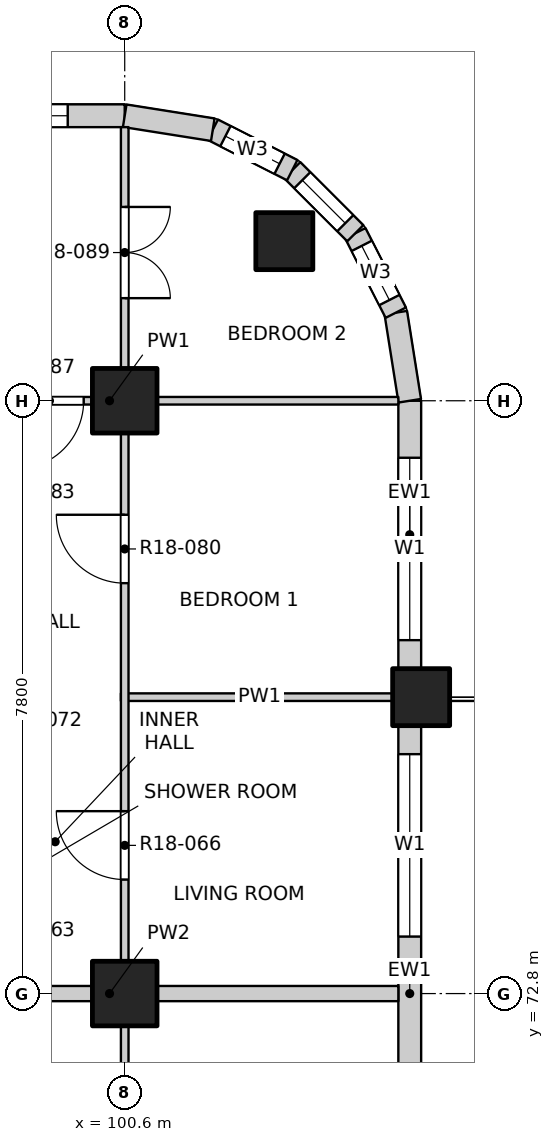
"""IFC4 building model, lengths in metres.
Left out: names, types, materials, properties, quantities, classifications, styles, units other than length and angle.
Written with IfcOpenShell. Run it as: python <this file> out.ifc"""

import sys

from ifc_helpers import new_model, si_unit, direction, frame, frame_2d, origin, origin_2d, place, context, subcontext, project, spatial, rectangle, extrude, element, fill, save


model = new_model("IFC4")
c1 = context("Model", 3, precision=1e-05, world=origin(), true_north=direction((0.0, 1.0)))
c2 = subcontext(c1, "Body", "Model", "MODEL_VIEW")
j1 = project(units=[si_unit("LENGTHUNIT", "METRE"), si_unit("PLANEANGLEUNIT", "RADIAN")], contexts=[c1])
p1 = place(None, origin())
s1 = spatial("IfcSite", under=j1, at=p1, CompositionType="ELEMENT")
p2 = place(p1, origin())
s2 = spatial("IfcBuilding", under=s1, at=p2, CompositionType="ELEMENT")
p3 = place(p2, frame((0.0, 0.0, 186.0)))
s3 = spatial("IfcBuildingStorey", under=s2, at=p3, CompositionType="ELEMENT", Elevation=186.0)
for number, where, z_axis, x_axis in (
    (1, (102.7, 82.7, -0.25), (0.0, 0.0, 1.0), (1.0, 0.0, 0.0)),
    (2, (104.5, 76.7, -0.25), (0.0, 0.0, 1.0), (1.0, 0.0, 0.0)),
):
    element("IfcColumn", number, at=place(p3, frame(where, z_axis=z_axis, x_axis=x_axis)), inside=s3, PredefinedType="COLUMN", context=c2, shape_type="SweptSolid", body=[
        extrude(rectangle(XDim=0.75, YDim=0.75, at=origin_2d()), origin(), (0.0, 0.0, 1.0), 3.4),
    ])
for number, where, z_axis, x_axis in (
    (3, (100.6, 72.8, -0.25), (0.0, 0.0, 1.0), (1.0, 0.0, 0.0)),
    (4, (100.6, 80.6, -0.25), (0.0, 0.0, 1.0), (1.0, 0.0, 0.0)),
):
    element("IfcColumn", number, at=place(p3, frame(where, z_axis=z_axis, x_axis=x_axis)), inside=s3, PredefinedType="COLUMN", context=c2, shape_type="SweptSolid", body=[
        extrude(rectangle(XDim=0.85, YDim=0.85, at=origin_2d()), origin(), (0.0, 0.0, 1.0), 3.4),
    ])
p4 = place(p3, frame((104.35, 69.275, 0.0), z_axis=(0.0, 0.0, 1.0), x_axis=(0.0, 1.0, 0.0)))
e5 = element("IfcWall", 5, at=p4, inside=s3, PredefinedType="SOLIDWALL", context=c2, shape_type="SweptSolid", body=[
    extrude(rectangle(XDim=7.05, YDim=0.3, at=frame_2d((3.525, 0.0))), origin(), (0.0, 0.0, 1.0), 2.7),
])
p5 = place(p4, frame((0.675, 0.0, 0.0)))
e6 = element("IfcOpeningElement", 6, at=p5, cuts=e5, PredefinedType="OPENING", context=c2, shape_type="SweptSolid", body=[
    extrude(rectangle(XDim=1.8, YDim=2.4, at=frame_2d((0.9, 1.2))), frame((0.0, 0.16, 0.0), z_axis=(0.0, -1.0, 0.0), x_axis=(1.0, 0.0, 0.0)), (0.0, 0.0, 1.0), 0.32),
])
p6 = place(p4, frame((4.275, 0.0, 0.9)))
e7 = element("IfcOpeningElement", 7, at=p6, cuts=e5, PredefinedType="OPENING", context=c2, shape_type="SweptSolid", body=[
    extrude(rectangle(XDim=2.4, YDim=1.8, at=frame_2d((1.2, 0.9))), frame((0.0, 0.16, 0.0), z_axis=(0.0, -1.0, 0.0), x_axis=(1.0, 0.0, 0.0)), (0.0, 0.0, 1.0), 0.32),
])
p7 = place(p3, frame((104.35, 77.075, 0.0), z_axis=(0.0, 0.0, 1.0), x_axis=(0.0, 1.0, 0.0)))
e8 = element("IfcWall", 8, at=p7, inside=s3, PredefinedType="SOLIDWALL", context=c2, shape_type="SweptSolid", body=[
    extrude(rectangle(XDim=3.525, YDim=0.3, at=frame_2d((1.763, 0.0))), origin(), (0.0, 0.0, 1.0), 2.7),
])
p8 = place(p7, frame((0.375, 0.0, 0.9)))
e9 = element("IfcOpeningElement", 9, at=p8, cuts=e8, PredefinedType="OPENING", context=c2, shape_type="SweptSolid", body=[
    extrude(rectangle(XDim=2.4, YDim=1.8, at=frame_2d((1.2, 0.9))), frame((0.0, 0.16, 0.0), z_axis=(0.0, -1.0, 0.0), x_axis=(1.0, 0.0, 0.0)), (0.0, 0.0, 1.0), 0.32),
])
p9 = place(p3, frame((97.075, 84.35, 0.0), z_axis=(0.0, 0.0, 1.0), x_axis=(1.0, 0.0, 0.0)))
e10 = element("IfcWall", 10, at=p9, inside=s3, PredefinedType="SOLIDWALL", context=c2, shape_type="SweptSolid", body=[
    extrude(rectangle(XDim=3.525, YDim=0.3, at=frame_2d((1.763, 0.0))), origin(), (0.0, 0.0, 1.0), 2.7),
])
p10 = place(p9, frame((0.375, 0.0, 0.9)))
e11 = element("IfcOpeningElement", 11, at=p10, cuts=e10, PredefinedType="OPENING", context=c2, shape_type="SweptSolid", body=[
    extrude(rectangle(XDim=2.4, YDim=1.8, at=frame_2d((1.2, 0.9))), frame((0.0, 0.16, 0.0), z_axis=(0.0, -1.0, 0.0), x_axis=(1.0, 0.0, 0.0)), (0.0, 0.0, 1.0), 0.32),
])
p11 = place(p3, frame((104.35, 80.6, 0.0), z_axis=(0.0, 0.0, 1.0), x_axis=(-0.156496880861, 0.987678452879, 0.0)))
e12 = element("IfcWall", 12, at=p11, inside=s3, PredefinedType="SOLIDWALL", context=c2, shape_type="SweptSolid", body=[
    extrude(rectangle(XDim=1.173, YDim=0.3, at=frame_2d((0.586, 0.0))), origin(), (0.0, 0.0, 1.0), 2.7),
])
p12 = place(p3, frame((104.167, 81.759, 0.0), z_axis=(0.0, 0.0, 1.0), x_axis=(-0.454025524128, 0.890988677504, 0.0)))
e13 = element("IfcWall", 13, at=p12, inside=s3, PredefinedType="SOLIDWALL", context=c2, shape_type="SweptSolid", body=[
    extrude(rectangle(XDim=1.173, YDim=0.3, at=frame_2d((0.587, 0.0))), origin(), (0.0, 0.0, 1.0), 2.7),
])
p13 = place(p12, frame((0.187, 0.0, 0.9)))
e14 = element("IfcOpeningElement", 14, at=p13, cuts=e13, PredefinedType="OPENING", context=c2, shape_type="SweptSolid", body=[
    extrude(rectangle(XDim=0.8, YDim=1.2, at=frame_2d((0.4, 0.6))), frame((0.0, 0.16, 0.0), z_axis=(0.0, -1.0, 0.0), x_axis=(1.0, 0.0, 0.0)), (0.0, 0.0, 1.0), 0.32),
])
p14 = place(p3, frame((103.634, 82.804, 0.0), z_axis=(0.0, 0.0, 1.0), x_axis=(-0.707106781187, 0.707106781187, 0.0)))
e15 = element("IfcWall", 15, at=p14, inside=s3, PredefinedType="SOLIDWALL", context=c2, shape_type="SweptSolid", body=[
    extrude(rectangle(XDim=1.173, YDim=0.3, at=frame_2d((0.586, 0.0))), origin(), (0.0, 0.0, 1.0), 2.7),
])
p15 = place(p14, frame((0.187, 0.0, 0.9)))
e16 = element("IfcOpeningElement", 16, at=p15, cuts=e15, PredefinedType="OPENING", context=c2, shape_type="SweptSolid", body=[
    extrude(rectangle(XDim=0.8, YDim=1.2, at=frame_2d((0.4, 0.6))), frame((0.0, 0.16, 0.0), z_axis=(0.0, -1.0, 0.0), x_axis=(1.0, 0.0, 0.0)), (0.0, 0.0, 1.0), 0.32),
])
p16 = place(p3, frame((102.804, 83.634, 0.0), z_axis=(0.0, 0.0, 1.0), x_axis=(-0.890988677504, 0.454025524128, 0.0)))
e17 = element("IfcWall", 17, at=p16, inside=s3, PredefinedType="SOLIDWALL", context=c2, shape_type="SweptSolid", body=[
    extrude(rectangle(XDim=1.173, YDim=0.3, at=frame_2d((0.587, 0.0))), origin(), (0.0, 0.0, 1.0), 2.7),
])
p17 = place(p16, frame((0.187, 0.0, 0.9)))
e18 = element("IfcOpeningElement", 18, at=p17, cuts=e17, PredefinedType="OPENING", context=c2, shape_type="SweptSolid", body=[
    extrude(rectangle(XDim=0.8, YDim=1.2, at=frame_2d((0.4, 0.6))), frame((0.0, 0.16, 0.0), z_axis=(0.0, -1.0, 0.0), x_axis=(1.0, 0.0, 0.0)), (0.0, 0.0, 1.0), 0.32),
])
p18 = place(p3, frame((101.759, 84.167, 0.0), z_axis=(0.0, 0.0, 1.0), x_axis=(-0.987678452879, 0.156496880861, 0.0)))
e19 = element("IfcWall", 19, at=p18, inside=s3, PredefinedType="SOLIDWALL", context=c2, shape_type="SweptSolid", body=[
    extrude(rectangle(XDim=1.173, YDim=0.3, at=frame_2d((0.586, 0.0))), origin(), (0.0, 0.0, 1.0), 2.7),
])
p19 = place(p3, frame((96.6, 72.8, 0.0), z_axis=(0.0, 0.0, 1.0), x_axis=(1.0, 0.0, 0.0)))
e20 = element("IfcWall", 20, at=p19, inside=s3, PredefinedType="PARTITIONING", context=c2, shape_type="SweptSolid", body=[
    extrude(rectangle(XDim=7.6, YDim=0.2, at=frame_2d((3.8, 0.0))), origin(), (0.0, 0.0, 1.0), 3.15),
])
p20 = place(p3, frame((100.55, 76.7, 0.0), z_axis=(0.0, 0.0, 1.0), x_axis=(1.0, 0.0, 0.0)))
e21 = element("IfcWall", 21, at=p20, inside=s3, PredefinedType="PARTITIONING", context=c2, shape_type="SweptSolid", body=[
    extrude(rectangle(XDim=3.65, YDim=0.1, at=frame_2d((1.825, 0.0))), origin(), (0.0, 0.0, 1.0), 2.55),
])
p21 = place(p3, frame((96.6, 80.6, 0.0), z_axis=(0.0, 0.0, 1.0), x_axis=(1.0, 0.0, 0.0)))
e22 = element("IfcWall", 22, at=p21, inside=s3, PredefinedType="PARTITIONING", context=c2, shape_type="SweptSolid", body=[
    extrude(rectangle(XDim=7.6, YDim=0.1, at=frame_2d((3.8, 0.0))), origin(), (0.0, 0.0, 1.0), 3.15),
])
p22 = place(p21, frame((2.56, 0.0, 0.0)))
e23 = element("IfcOpeningElement", 23, at=p22, cuts=e22, PredefinedType="OPENING", context=c2, shape_type="SweptSolid", body=[
    extrude(rectangle(XDim=0.9, YDim=2.1, at=frame_2d((0.45, 1.05))), frame((0.0, 0.06, 0.0), z_axis=(0.0, -1.0, 0.0), x_axis=(1.0, 0.0, 0.0)), (0.0, 0.0, 1.0), 0.12),
])
p23 = place(p3, frame((100.6, 45.8, 0.0), z_axis=(0.0, 0.0, 1.0), x_axis=(0.0, 1.0, 0.0)))
e24 = element("IfcWall", 24, at=p23, inside=s3, PredefinedType="PARTITIONING", context=c2, shape_type="SweptSolid", body=[
    extrude(rectangle(XDim=38.4, YDim=0.1, at=frame_2d((19.2, 0.0))), origin(), (0.0, 0.0, 1.0), 3.15),
])
p24 = place(p23, frame((1.05, 0.0, 0.0)))
e25 = element("IfcOpeningElement", 25, at=p24, cuts=e24, PredefinedType="OPENING", context=c2, shape_type="SweptSolid", body=[
    extrude(rectangle(XDim=1.2, YDim=2.1, at=frame_2d((0.6, 1.05))), frame((0.0, 0.06, 0.0), z_axis=(0.0, -1.0, 0.0), x_axis=(1.0, 0.0, 0.0)), (0.0, 0.0, 1.0), 0.12),
])
p25 = place(p23, frame((5.1, 0.0, 0.0)))
e26 = element("IfcOpeningElement", 26, at=p25, cuts=e24, PredefinedType="OPENING", context=c2, shape_type="SweptSolid", body=[
    extrude(rectangle(XDim=0.9, YDim=2.1, at=frame_2d((0.45, 1.05))), frame((0.0, 0.06, 0.0), z_axis=(0.0, -1.0, 0.0), x_axis=(1.0, 0.0, 0.0)), (0.0, 0.0, 1.0), 0.12),
])
p26 = place(p23, frame((9.0, 0.0, 0.0)))
e27 = element("IfcOpeningElement", 27, at=p26, cuts=e24, PredefinedType="OPENING", context=c2, shape_type="SweptSolid", body=[
    extrude(rectangle(XDim=0.9, YDim=2.1, at=frame_2d((0.45, 1.05))), frame((0.0, 0.06, 0.0), z_axis=(0.0, -1.0, 0.0), x_axis=(1.0, 0.0, 0.0)), (0.0, 0.0, 1.0), 0.12),
])
p27 = place(p23, frame((12.9, 0.0, 0.0)))
e28 = element("IfcOpeningElement", 28, at=p27, cuts=e24, PredefinedType="OPENING", context=c2, shape_type="SweptSolid", body=[
    extrude(rectangle(XDim=0.9, YDim=2.1, at=frame_2d((0.45, 1.05))), frame((0.0, 0.06, 0.0), z_axis=(0.0, -1.0, 0.0), x_axis=(1.0, 0.0, 0.0)), (0.0, 0.0, 1.0), 0.12),
])
p28 = place(p23, frame((19.725, 0.0, 0.0)))
e29 = element("IfcOpeningElement", 29, at=p28, cuts=e24, PredefinedType="OPENING", context=c2, shape_type="SweptSolid", body=[
    extrude(rectangle(XDim=1.2, YDim=2.1, at=frame_2d((0.6, 1.05))), frame((0.0, 0.06, 0.0), z_axis=(0.0, -1.0, 0.0), x_axis=(1.0, 0.0, 0.0)), (0.0, 0.0, 1.0), 0.12),
])
p29 = place(p23, frame((24.6, 0.0, 0.0)))
e30 = element("IfcOpeningElement", 30, at=p29, cuts=e24, PredefinedType="OPENING", context=c2, shape_type="SweptSolid", body=[
    extrude(rectangle(XDim=0.9, YDim=2.1, at=frame_2d((0.45, 1.05))), frame((0.0, 0.06, 0.0), z_axis=(0.0, -1.0, 0.0), x_axis=(1.0, 0.0, 0.0)), (0.0, 0.0, 1.0), 0.12),
])
p30 = place(p23, frame((28.5, 0.0, 0.0)))
e31 = element("IfcOpeningElement", 31, at=p30, cuts=e24, PredefinedType="OPENING", context=c2, shape_type="SweptSolid", body=[
    extrude(rectangle(XDim=0.9, YDim=2.1, at=frame_2d((0.45, 1.05))), frame((0.0, 0.06, 0.0), z_axis=(0.0, -1.0, 0.0), x_axis=(1.0, 0.0, 0.0)), (0.0, 0.0, 1.0), 0.12),
])
p31 = place(p23, frame((32.4, 0.0, 0.0)))
e32 = element("IfcOpeningElement", 32, at=p31, cuts=e24, PredefinedType="OPENING", context=c2, shape_type="SweptSolid", body=[
    extrude(rectangle(XDim=0.9, YDim=2.1, at=frame_2d((0.45, 1.05))), frame((0.0, 0.06, 0.0), z_axis=(0.0, -1.0, 0.0), x_axis=(1.0, 0.0, 0.0)), (0.0, 0.0, 1.0), 0.12),
])
p32 = place(p23, frame((36.15, 0.0, 0.0)))
e33 = element("IfcOpeningElement", 33, at=p32, cuts=e24, PredefinedType="OPENING", context=c2, shape_type="SweptSolid", body=[
    extrude(rectangle(XDim=1.2, YDim=2.1, at=frame_2d((0.6, 1.05))), frame((0.0, 0.06, 0.0), z_axis=(0.0, -1.0, 0.0), x_axis=(1.0, 0.0, 0.0)), (0.0, 0.0, 1.0), 0.12),
])
p33 = place(p6, origin())
e34 = element("IfcWindow", 34, at=p33, inside=s3, PartitioningType="DOUBLE_PANEL_VERTICAL", PredefinedType="WINDOW", context=c2, shape_type="SweptSolid", body=[
    extrude(rectangle(XDim=2.4, YDim=1.8, at=frame_2d((1.2, 0.9))), frame((0.0, 0.03, 0.0), z_axis=(0.0, -1.0, 0.0), x_axis=(1.0, 0.0, 0.0)), (0.0, 0.0, 1.0), 0.06),
])
fill(e7, e34)
p34 = place(p8, origin())
e35 = element("IfcWindow", 35, at=p34, inside=s3, PartitioningType="DOUBLE_PANEL_VERTICAL", PredefinedType="WINDOW", context=c2, shape_type="SweptSolid", body=[
    extrude(rectangle(XDim=2.4, YDim=1.8, at=frame_2d((1.2, 0.9))), frame((0.0, 0.03, 0.0), z_axis=(0.0, -1.0, 0.0), x_axis=(1.0, 0.0, 0.0)), (0.0, 0.0, 1.0), 0.06),
])
fill(e9, e35)
p35 = place(p10, origin())
e36 = element("IfcWindow", 36, at=p35, inside=s3, PartitioningType="DOUBLE_PANEL_VERTICAL", PredefinedType="WINDOW", context=c2, shape_type="SweptSolid", body=[
    extrude(rectangle(XDim=2.4, YDim=1.8, at=frame_2d((1.2, 0.9))), frame((0.0, 0.03, 0.0), z_axis=(0.0, -1.0, 0.0), x_axis=(1.0, 0.0, 0.0)), (0.0, 0.0, 1.0), 0.06),
])
fill(e11, e36)
p36 = place(p13, origin())
e37 = element("IfcWindow", 37, at=p36, inside=s3, PartitioningType="SINGLE_PANEL", PredefinedType="WINDOW", context=c2, shape_type="SweptSolid", body=[
    extrude(rectangle(XDim=0.8, YDim=1.2, at=frame_2d((0.4, 0.6))), frame((0.0, 0.03, 0.0), z_axis=(0.0, -1.0, 0.0), x_axis=(1.0, 0.0, 0.0)), (0.0, 0.0, 1.0), 0.06),
])
fill(e14, e37)
p37 = place(p15, origin())
e38 = element("IfcWindow", 38, at=p37, inside=s3, PartitioningType="SINGLE_PANEL", PredefinedType="WINDOW", context=c2, shape_type="SweptSolid", body=[
    extrude(rectangle(XDim=0.8, YDim=1.2, at=frame_2d((0.4, 0.6))), frame((0.0, 0.03, 0.0), z_axis=(0.0, -1.0, 0.0), x_axis=(1.0, 0.0, 0.0)), (0.0, 0.0, 1.0), 0.06),
])
fill(e16, e38)
p38 = place(p17, origin())
e39 = element("IfcWindow", 39, at=p38, inside=s3, PartitioningType="SINGLE_PANEL", PredefinedType="WINDOW", context=c2, shape_type="SweptSolid", body=[
    extrude(rectangle(XDim=0.8, YDim=1.2, at=frame_2d((0.4, 0.6))), frame((0.0, 0.03, 0.0), z_axis=(0.0, -1.0, 0.0), x_axis=(1.0, 0.0, 0.0)), (0.0, 0.0, 1.0), 0.06),
])
fill(e18, e39)
p39 = place(p30, origin())
e40 = element("IfcDoor", 40, at=p39, inside=s3, OperationType="SINGLE_SWING_RIGHT", PredefinedType="DOOR", context=c2, shape_type="SweptSolid", body=[
    extrude(rectangle(XDim=0.9, YDim=2.1, at=frame_2d((0.45, 1.05))), frame((0.0, 0.025, 0.0), z_axis=(0.0, -1.0, 0.0), x_axis=(1.0, 0.0, 0.0)), (0.0, 0.0, 1.0), 0.05),
])
fill(e31, e40)
p40 = place(p31, origin())
e41 = element("IfcDoor", 41, at=p40, inside=s3, OperationType="SINGLE_SWING_RIGHT", PredefinedType="DOOR", context=c2, shape_type="SweptSolid", body=[
    extrude(rectangle(XDim=0.9, YDim=2.1, at=frame_2d((0.45, 1.05))), frame((0.0, 0.025, 0.0), z_axis=(0.0, -1.0, 0.0), x_axis=(1.0, 0.0, 0.0)), (0.0, 0.0, 1.0), 0.05),
])
fill(e32, e41)
p41 = place(p22, origin())
e42 = element("IfcDoor", 42, at=p41, inside=s3, OperationType="SINGLE_SWING_RIGHT", PredefinedType="DOOR", context=c2, shape_type="SweptSolid", body=[
    extrude(rectangle(XDim=0.9, YDim=2.1, at=frame_2d((0.45, 1.05))), frame((0.0, 0.025, 0.0), z_axis=(0.0, -1.0, 0.0), x_axis=(1.0, 0.0, 0.0)), (0.0, 0.0, 1.0), 0.05),
])
fill(e23, e42)
p42 = place(p32, origin())
e43 = element("IfcDoor", 43, at=p42, inside=s3, OperationType="DOUBLE_DOOR_SINGLE_SWING", PredefinedType="DOOR", context=c2, shape_type="SweptSolid", body=[
    extrude(rectangle(XDim=1.2, YDim=2.1, at=frame_2d((0.6, 1.05))), frame((0.0, 0.025, 0.0), z_axis=(0.0, -1.0, 0.0), x_axis=(1.0, 0.0, 0.0)), (0.0, 0.0, 1.0), 0.05),
])
fill(e33, e43)
save(model, sys.argv[1])
